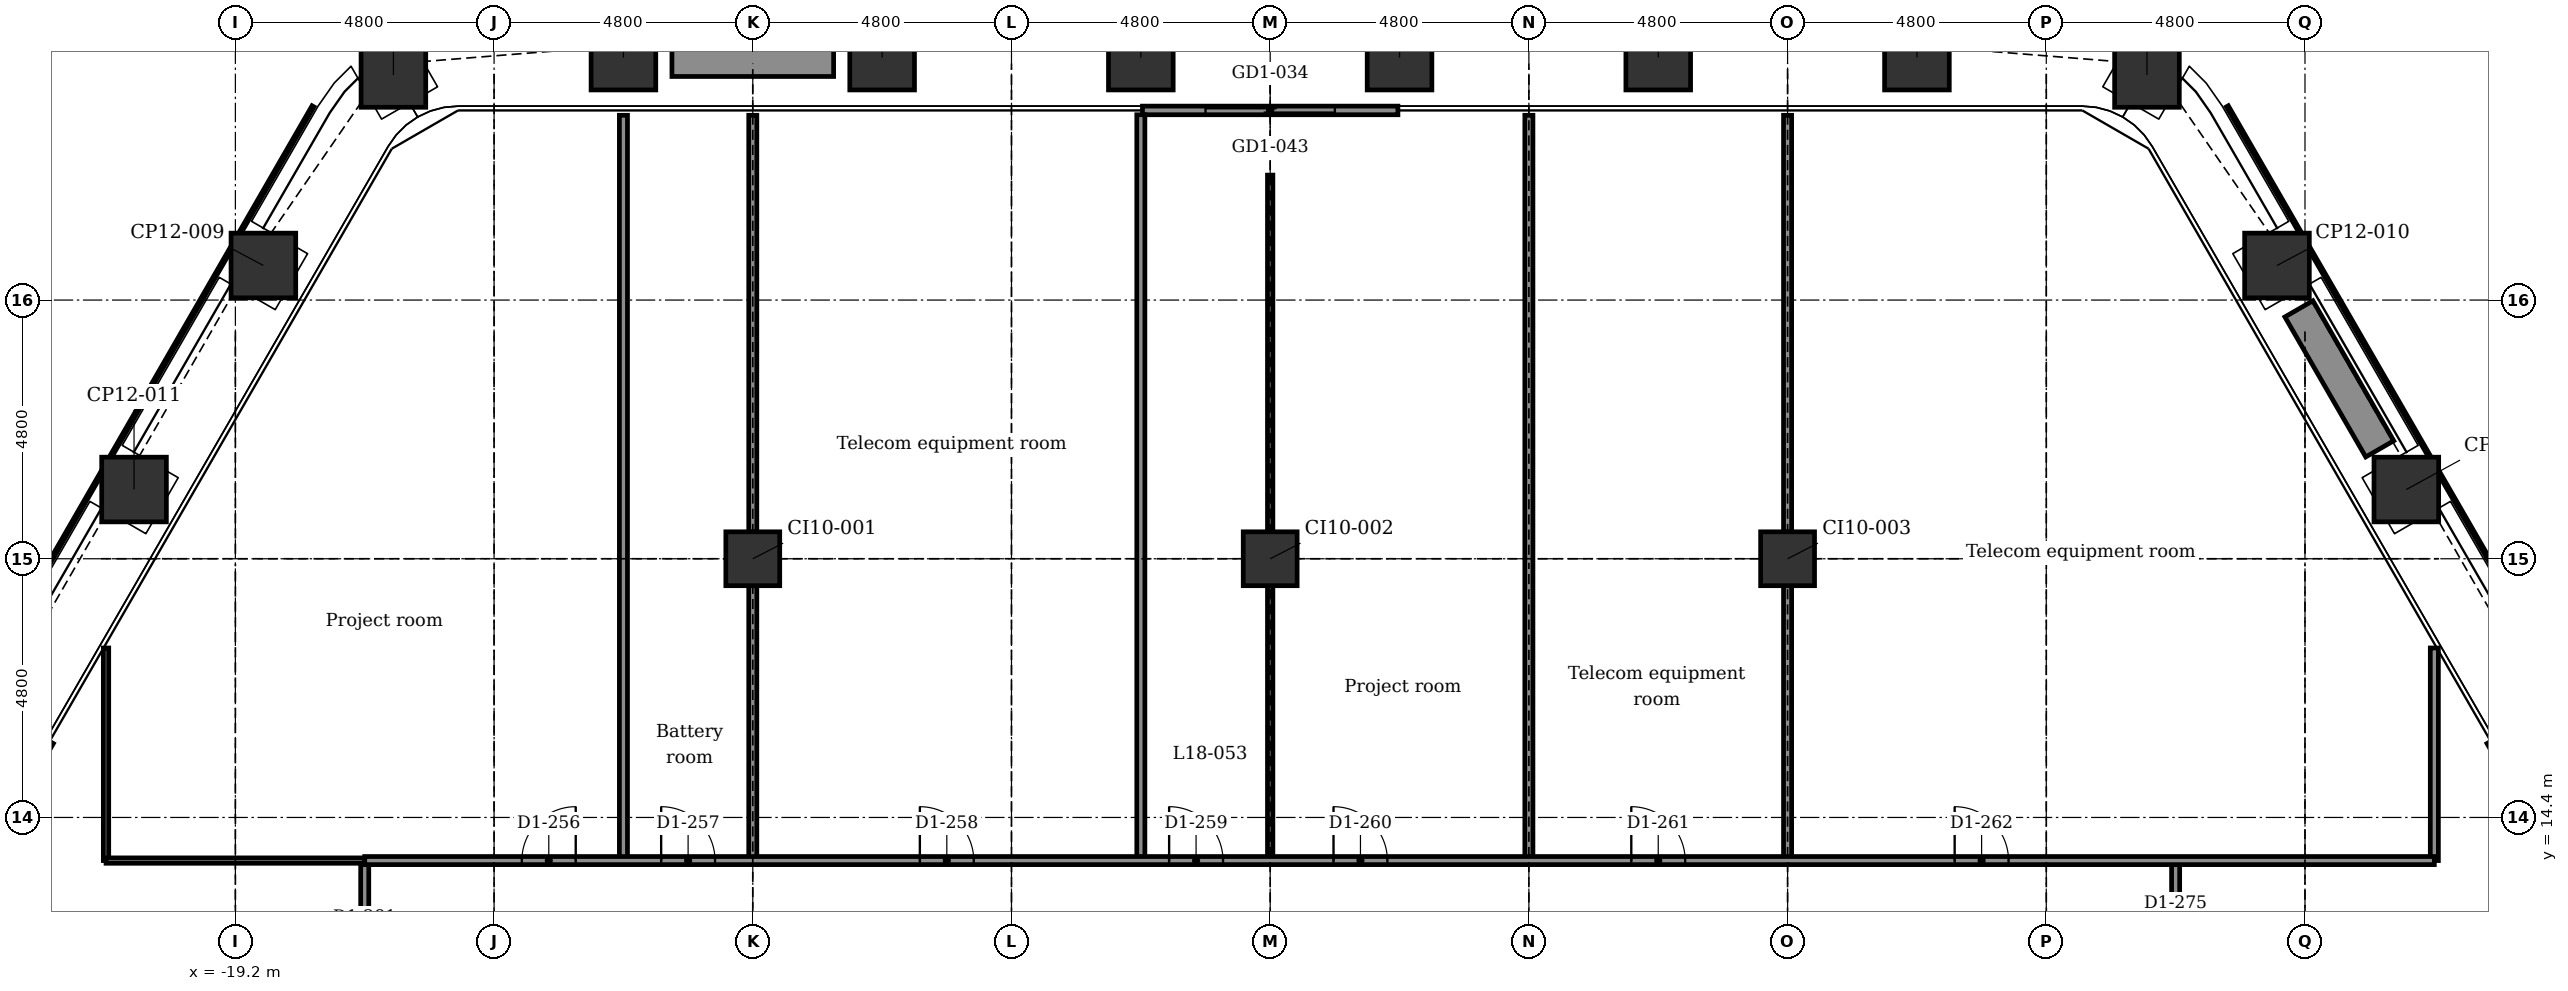
"""IFC4 building model, lengths in metres.
Left out: names, types, materials, properties, quantities, classifications, styles, units other than length and angle.
Written with IfcOpenShell. Run it as: python <this file> out.ifc"""

import sys

from ifc_helpers import new_model, si_unit, direction, frame, frame_2d, origin, origin_2d, place, context, subcontext, project, spatial, rectangle, extrude, element, fill, save


model = new_model("IFC4")
c1 = context("Model", 3, precision=1e-05, world=origin(), true_north=direction((0.0, 1.0)))
c2 = subcontext(c1, "Body", "Model", "MODEL_VIEW")
j1 = project(units=[si_unit("LENGTHUNIT", "METRE"), si_unit("PLANEANGLEUNIT", "RADIAN")], contexts=[c1])
p1 = place(None, origin())
s1 = spatial("IfcSite", under=j1, at=p1, CompositionType="ELEMENT")
p2 = place(p1, origin())
s2 = spatial("IfcBuilding", under=s1, at=p2, CompositionType="ELEMENT")
p3 = place(p2, frame((0.0, 0.0, 95.9)))
s3 = spatial("IfcBuildingStorey", under=s2, at=p3, CompositionType="ELEMENT", Elevation=95.9)
for number, where, z_axis, x_axis in (
    (1, (-16.268, 28.177, -0.2), (0.0, 0.0, 1.0), (0.866, 0.5, 0.0)),
    (2, (-12.0, 28.499, -0.2), (0.0, 0.0, 1.0), (1.0, 0.0, 0.0)),
    (3, (-7.2, 28.499, -0.2), (0.0, 0.0, 1.0), (1.0, 0.0, 0.0)),
    (4, (-2.4, 28.499, -0.2), (0.0, 0.0, 1.0), (1.0, 0.0, 0.0)),
    (5, (2.4, 28.499, -0.2), (0.0, 0.0, 1.0), (1.0, 0.0, 0.0)),
    (6, (7.2, 28.499, -0.2), (0.0, 0.0, 1.0), (1.0, 0.0, 0.0)),
    (7, (12.0, 28.499, -0.2), (0.0, 0.0, 1.0), (1.0, 0.0, 0.0)),
    (8, (16.268, 28.177, -0.2), (0.0, 0.0, 1.0), (0.5, 0.866, 0.0)),
    (9, (18.68, 24.642, -0.2), (0.0, 0.0, 1.0), (0.866, 0.5, 0.0)),
    (10, (21.08, 20.485, -0.2), (0.0, 0.0, 1.0), (0.866, 0.5, 0.0)),
    (11, (-21.08, 20.485, -0.2), (0.0, 0.0, 1.0), (0.5, 0.866, 0.0)),
    (12, (-18.68, 24.642, -0.2), (0.0, 0.0, 1.0), (0.5, 0.866, 0.0)),
):
    element("IfcColumn", number, at=place(p3, frame(where, z_axis=z_axis, x_axis=x_axis)), inside=s3, PredefinedType="COLUMN", context=c2, shape_type="SweptSolid", body=[
        extrude(rectangle(XDim=1.2, YDim=1.2, at=origin_2d()), origin(), (0.0, 0.0, 1.0), 4.5),
    ])
for number, where, z_axis, x_axis in (
    (13, (-9.6, 19.2, -0.2), (0.0, 0.0, 1.0), (1.0, 0.0, 0.0)),
    (14, (0.0, 19.2, -0.2), (0.0, 0.0, 1.0), (1.0, 0.0, 0.0)),
    (15, (9.6, 19.2, -0.2), (0.0, 0.0, 1.0), (1.0, 0.0, 0.0)),
):
    element("IfcColumn", number, at=place(p3, frame(where, z_axis=z_axis, x_axis=x_axis)), inside=s3, PredefinedType="COLUMN", context=c2, shape_type="SweptSolid", body=[
        extrude(rectangle(XDim=1.0, YDim=1.0, at=origin_2d()), origin(), (0.0, 0.0, 1.0), 4.5),
    ])
p4 = place(p3, frame((-2.37, 27.519, 0.0), z_axis=(0.0, 0.0, 1.0), x_axis=(1.0, 0.0, 0.0)))
e16 = element("IfcWall", 16, at=p4, inside=s3, PredefinedType="PARTITIONING", context=c2, shape_type="SweptSolid", body=[
    extrude(rectangle(XDim=4.74, YDim=0.16, at=frame_2d((2.37, 0.0))), origin(), (0.0, 0.0, 1.0), 4.3),
])
p5 = place(p4, frame((1.17, 0.0, 0.0)))
e17 = element("IfcOpeningElement", 17, at=p5, cuts=e16, PredefinedType="OPENING", context=c2, shape_type="SweptSolid", body=[
    extrude(rectangle(XDim=2.4, YDim=2.4, at=frame_2d((1.2, 1.2))), frame((0.0, 0.09, 0.0), z_axis=(0.0, -1.0, 0.0), x_axis=(1.0, 0.0, 0.0)), (0.0, 0.0, 1.0), 0.18),
])
p6 = place(p3, frame((22.647, 15.812, 0.0), z_axis=(0.0, 0.0, 1.0), x_axis=(0.499978080042, -0.866038058908, 0.0)))
e18 = element("IfcWall", 18, at=p6, inside=s3, PredefinedType="PARTITIONING", context=c2, shape_type="SweptSolid", body=[
    extrude(rectangle(XDim=4.74, YDim=0.16, at=frame_2d((2.37, 0.0))), origin(), (0.0, 0.0, 1.0), 4.3),
])
p7 = place(p6, frame((1.17, 0.0, 0.0)))
e19 = element("IfcOpeningElement", 19, at=p7, cuts=e18, PredefinedType="OPENING", context=c2, shape_type="SweptSolid", body=[
    extrude(rectangle(XDim=2.4, YDim=2.4, at=frame_2d((1.2, 1.2))), frame((0.0, 0.09, 0.0), z_axis=(0.0, -1.0, 0.0), x_axis=(1.0, 0.0, 0.0)), (0.0, 0.0, 1.0), 0.18),
])
p8 = place(p3, frame((-25.017, 11.707, 0.0), z_axis=(0.0, 0.0, 1.0), x_axis=(0.499978080042, 0.866038058908, 0.0)))
e20 = element("IfcWall", 20, at=p8, inside=s3, PredefinedType="PARTITIONING", context=c2, shape_type="SweptSolid", body=[
    extrude(rectangle(XDim=4.74, YDim=0.16, at=frame_2d((2.37, 0.0))), origin(), (0.0, 0.0, 1.0), 4.3),
])
p9 = place(p8, frame((1.17, 0.0, 0.0)))
e21 = element("IfcOpeningElement", 21, at=p9, cuts=e20, PredefinedType="OPENING", context=c2, shape_type="SweptSolid", body=[
    extrude(rectangle(XDim=2.4, YDim=2.4, at=frame_2d((1.2, 1.2))), frame((0.0, 0.09, 0.0), z_axis=(0.0, -1.0, 0.0), x_axis=(1.0, 0.0, 0.0)), (0.0, 0.0, 1.0), 0.18),
])
for number, where, z_axis, x_axis in (
    (22, (-11.1, 28.448, 0.0), (0.0, 0.0, 1.0), (1.0, 0.0, 0.0)),
    (23, (19.087, 23.837, 0.0), (0.0, 0.0, 1.0), (0.5, -0.866, 0.0)),
):
    element("IfcWall", number, at=place(p3, frame(where, z_axis=z_axis, x_axis=x_axis)), inside=s3, PredefinedType="USERDEFINED", context=c2, shape_type="SweptSolid", body=[
        extrude(rectangle(XDim=3.0, YDim=0.6, at=frame_2d((1.5, 0.0))), origin(), (0.0, 0.0, 1.0), 0.7),
    ])
p10 = place(p3, frame((21.6, 13.6, 0.0), z_axis=(0.0, 0.0, 1.0), x_axis=(0.0, 1.0, 0.0)))
e24 = element("IfcWall", 24, at=p10, inside=s3, PredefinedType="PARTITIONING", context=c2, shape_type="SweptSolid", body=[
    extrude(rectangle(XDim=3.945, YDim=0.15, at=frame_2d((1.972, 0.0))), origin(), (0.0, 0.0, 1.0), 4.3),
])
p11 = place(p3, frame((16.8, 3.95, 0.0), z_axis=(0.0, 0.0, 1.0), x_axis=(0.0, 1.0, 0.0)))
e25 = element("IfcWall", 25, at=p11, inside=s3, PredefinedType="PARTITIONING", context=c2, shape_type="SweptSolid", body=[
    extrude(rectangle(XDim=9.65, YDim=0.15, at=frame_2d((4.825, 0.0))), origin(), (0.0, 0.0, 1.0), 4.3),
])
p12 = place(p11, frame((0.95, 0.0, 0.0)))
e26 = element("IfcOpeningElement", 26, at=p12, cuts=e25, PredefinedType="OPENING", context=c2, shape_type="SweptSolid", body=[
    extrude(rectangle(XDim=1.0, YDim=2.1, at=frame_2d((0.5, 1.05))), frame((0.0, 0.085, 0.0), z_axis=(0.0, -1.0, 0.0), x_axis=(1.0, 0.0, 0.0)), (0.0, 0.0, 1.0), 0.17),
])
p13 = place(p11, frame((4.095, 0.0, 0.0)))
e27 = element("IfcOpeningElement", 27, at=p13, cuts=e25, PredefinedType="OPENING", context=c2, shape_type="SweptSolid", body=[
    extrude(rectangle(XDim=1.0, YDim=2.1, at=frame_2d((0.5, 1.05))), frame((0.0, 0.085, 0.0), z_axis=(0.0, -1.0, 0.0), x_axis=(1.0, 0.0, 0.0)), (0.0, 0.0, 1.0), 0.17),
])
p14 = place(p11, frame((7.35, 0.0, 0.0)))
e28 = element("IfcOpeningElement", 28, at=p14, cuts=e25, PredefinedType="OPENING", context=c2, shape_type="SweptSolid", body=[
    extrude(rectangle(XDim=1.0, YDim=2.1, at=frame_2d((0.5, 1.05))), frame((0.0, 0.085, 0.0), z_axis=(0.0, -1.0, 0.0), x_axis=(1.0, 0.0, 0.0)), (0.0, 0.0, 1.0), 0.17),
])
p15 = place(p3, frame((9.6, 13.6, 0.0), z_axis=(0.0, 0.0, 1.0), x_axis=(0.0, 1.0, 0.0)))
e29 = element("IfcWall", 29, at=p15, inside=s3, PredefinedType="PARTITIONING", context=c2, shape_type="SweptSolid", body=[
    extrude(rectangle(XDim=5.1, YDim=0.15, at=frame_2d((2.55, 0.0))), origin(), (0.0, 0.0, 1.0), 3.843),
])
p16 = place(p3, frame((9.6, 19.7, 0.0), z_axis=(0.0, 0.0, 1.0), x_axis=(0.0, 1.0, 0.0)))
e30 = element("IfcWall", 30, at=p16, inside=s3, PredefinedType="PARTITIONING", context=c2, shape_type="SweptSolid", body=[
    extrude(rectangle(XDim=7.729, YDim=0.15, at=frame_2d((3.864, 0.0))), origin(), (0.0, 0.0, 1.0), 3.843),
])
p17 = place(p3, frame((4.8, 13.6, 0.0), z_axis=(0.0, 0.0, 1.0), x_axis=(0.0, 1.0, 0.0)))
e31 = element("IfcWall", 31, at=p17, inside=s3, PredefinedType="PARTITIONING", context=c2, shape_type="SweptSolid", body=[
    extrude(rectangle(XDim=13.828, YDim=0.15, at=frame_2d((6.914, 0.0))), origin(), (0.0, 0.0, 1.0), 3.843),
])
p18 = place(p3, frame((0.0, 13.6, 0.0), z_axis=(0.0, 0.0, 1.0), x_axis=(0.0, 1.0, 0.0)))
e32 = element("IfcWall", 32, at=p18, inside=s3, PredefinedType="PARTITIONING", context=c2, shape_type="SweptSolid", body=[
    extrude(rectangle(XDim=5.1, YDim=0.1, at=frame_2d((2.55, 0.0))), origin(), (0.0, 0.0, 1.0), 3.843),
])
p19 = place(p3, frame((0.0, 19.7, 0.0), z_axis=(0.0, 0.0, 1.0), x_axis=(0.0, 1.0, 0.0)))
e33 = element("IfcWall", 33, at=p19, inside=s3, PredefinedType="PARTITIONING", context=c2, shape_type="SweptSolid", body=[
    extrude(rectangle(XDim=6.619, YDim=0.1, at=frame_2d((3.309, 0.0))), origin(), (0.0, 0.0, 1.0), 3.843),
])
p20 = place(p3, frame((-2.4, 13.6, 0.0), z_axis=(0.0, 0.0, 1.0), x_axis=(0.0, 1.0, 0.0)))
e34 = element("IfcWall", 34, at=p20, inside=s3, PredefinedType="PARTITIONING", context=c2, shape_type="SweptSolid", body=[
    extrude(rectangle(XDim=13.838, YDim=0.15, at=frame_2d((6.919, 0.0))), origin(), (0.0, 0.0, 1.0), 4.3),
])
p21 = place(p3, frame((-9.6, 13.6, 0.0), z_axis=(0.0, 0.0, 1.0), x_axis=(0.0, 1.0, 0.0)))
e35 = element("IfcWall", 35, at=p21, inside=s3, PredefinedType="PARTITIONING", context=c2, shape_type="SweptSolid", body=[
    extrude(rectangle(XDim=5.1, YDim=0.15, at=frame_2d((2.55, 0.0))), origin(), (0.0, 0.0, 1.0), 3.843),
])
p22 = place(p3, frame((-9.6, 19.7, 0.0), z_axis=(0.0, 0.0, 1.0), x_axis=(0.0, 1.0, 0.0)))
e36 = element("IfcWall", 36, at=p22, inside=s3, PredefinedType="PARTITIONING", context=c2, shape_type="SweptSolid", body=[
    extrude(rectangle(XDim=7.729, YDim=0.15, at=frame_2d((3.864, 0.0))), origin(), (0.0, 0.0, 1.0), 3.843),
])
p23 = place(p3, frame((-12.0, 13.6, 0.0), z_axis=(0.0, 0.0, 1.0), x_axis=(0.0, 1.0, 0.0)))
e37 = element("IfcWall", 37, at=p23, inside=s3, PredefinedType="PARTITIONING", context=c2, shape_type="SweptSolid", body=[
    extrude(rectangle(XDim=13.828, YDim=0.15, at=frame_2d((6.914, 0.0))), origin(), (0.0, 0.0, 1.0), 4.3),
])
p24 = place(p3, frame((-16.8, 3.95, 0.0), z_axis=(0.0, 0.0, 1.0), x_axis=(0.0, 1.0, 0.0)))
e38 = element("IfcWall", 38, at=p24, inside=s3, PredefinedType="PARTITIONING", context=c2, shape_type="SweptSolid", body=[
    extrude(rectangle(XDim=9.65, YDim=0.15, at=frame_2d((4.825, 0.0))), origin(), (0.0, 0.0, 1.0), 4.3),
])
p25 = place(p24, frame((0.95, 0.0, 0.0)))
e39 = element("IfcOpeningElement", 39, at=p25, cuts=e38, PredefinedType="OPENING", context=c2, shape_type="SweptSolid", body=[
    extrude(rectangle(XDim=1.0, YDim=2.1, at=frame_2d((0.5, 1.05))), frame((0.0, 0.085, 0.0), z_axis=(0.0, -1.0, 0.0), x_axis=(1.0, 0.0, 0.0)), (0.0, 0.0, 1.0), 0.17),
])
p26 = place(p24, frame((4.095, 0.0, 0.0)))
e40 = element("IfcOpeningElement", 40, at=p26, cuts=e38, PredefinedType="OPENING", context=c2, shape_type="SweptSolid", body=[
    extrude(rectangle(XDim=1.0, YDim=2.1, at=frame_2d((0.5, 1.05))), frame((0.0, 0.085, 0.0), z_axis=(0.0, -1.0, 0.0), x_axis=(1.0, 0.0, 0.0)), (0.0, 0.0, 1.0), 0.17),
])
p27 = place(p24, frame((7.095, 0.0, 0.0)))
e41 = element("IfcOpeningElement", 41, at=p27, cuts=e38, PredefinedType="OPENING", context=c2, shape_type="SweptSolid", body=[
    extrude(rectangle(XDim=1.0, YDim=2.1, at=frame_2d((0.5, 1.05))), frame((0.0, 0.085, 0.0), z_axis=(0.0, -1.0, 0.0), x_axis=(1.0, 0.0, 0.0)), (0.0, 0.0, 1.0), 0.17),
])
p28 = place(p3, frame((-21.6, 13.6, 0.0), z_axis=(0.0, 0.0, 1.0), x_axis=(0.0, 1.0, 0.0)))
e42 = element("IfcWall", 42, at=p28, inside=s3, PredefinedType="PARTITIONING", context=c2, shape_type="SweptSolid", body=[
    extrude(rectangle(XDim=3.945, YDim=0.1, at=frame_2d((1.972, 0.0))), origin(), (0.0, 0.0, 1.0), 4.3),
])
p29 = place(p3, frame((-21.6, 13.6, 0.0), z_axis=(0.0, 0.0, 1.0), x_axis=(1.0, 0.0, 0.0)))
e43 = element("IfcWall", 43, at=p29, inside=s3, PredefinedType="PARTITIONING", context=c2, shape_type="SweptSolid", body=[
    extrude(rectangle(XDim=4.8, YDim=0.1, at=frame_2d((2.4, 0.0))), origin(), (0.0, 0.0, 1.0), 4.3),
])
p30 = place(p3, frame((-16.8, 13.6, 0.0), z_axis=(0.0, 0.0, 1.0), x_axis=(1.0, 0.0, 0.0)))
e44 = element("IfcWall", 44, at=p30, inside=s3, PredefinedType="PARTITIONING", context=c2, shape_type="SweptSolid", body=[
    extrude(rectangle(XDim=38.4, YDim=0.15, at=frame_2d((19.2, 0.0))), origin(), (0.0, 0.0, 1.0), 4.3),
])
p31 = place(p30, frame((2.915, 0.0, 0.0)))
e45 = element("IfcOpeningElement", 45, at=p31, cuts=e44, PredefinedType="OPENING", context=c2, shape_type="SweptSolid", body=[
    extrude(rectangle(XDim=1.0, YDim=2.1, at=frame_2d((0.5, 1.05))), frame((0.0, 0.085, 0.0), z_axis=(0.0, -1.0, 0.0), x_axis=(1.0, 0.0, 0.0)), (0.0, 0.0, 1.0), 0.17),
])
p32 = place(p30, frame((5.5, 0.0, 0.0)))
e46 = element("IfcOpeningElement", 46, at=p32, cuts=e44, PredefinedType="OPENING", context=c2, shape_type="SweptSolid", body=[
    extrude(rectangle(XDim=1.0, YDim=2.1, at=frame_2d((0.5, 1.05))), frame((0.0, 0.085, 0.0), z_axis=(0.0, -1.0, 0.0), x_axis=(1.0, 0.0, 0.0)), (0.0, 0.0, 1.0), 0.17),
])
p33 = place(p30, frame((10.3, 0.0, 0.0)))
e47 = element("IfcOpeningElement", 47, at=p33, cuts=e44, PredefinedType="OPENING", context=c2, shape_type="SweptSolid", body=[
    extrude(rectangle(XDim=1.0, YDim=2.1, at=frame_2d((0.5, 1.05))), frame((0.0, 0.085, 0.0), z_axis=(0.0, -1.0, 0.0), x_axis=(1.0, 0.0, 0.0)), (0.0, 0.0, 1.0), 0.17),
])
p34 = place(p30, frame((14.925, 0.0, 0.0)))
e48 = element("IfcOpeningElement", 48, at=p34, cuts=e44, PredefinedType="OPENING", context=c2, shape_type="SweptSolid", body=[
    extrude(rectangle(XDim=1.0, YDim=2.1, at=frame_2d((0.5, 1.05))), frame((0.0, 0.085, 0.0), z_axis=(0.0, -1.0, 0.0), x_axis=(1.0, 0.0, 0.0)), (0.0, 0.0, 1.0), 0.17),
])
p35 = place(p30, frame((17.975, 0.0, 0.0)))
e49 = element("IfcOpeningElement", 49, at=p35, cuts=e44, PredefinedType="OPENING", context=c2, shape_type="SweptSolid", body=[
    extrude(rectangle(XDim=1.0, YDim=2.1, at=frame_2d((0.5, 1.05))), frame((0.0, 0.085, 0.0), z_axis=(0.0, -1.0, 0.0), x_axis=(1.0, 0.0, 0.0)), (0.0, 0.0, 1.0), 0.17),
])
p36 = place(p30, frame((23.5, 0.0, 0.0)))
e50 = element("IfcOpeningElement", 50, at=p36, cuts=e44, PredefinedType="OPENING", context=c2, shape_type="SweptSolid", body=[
    extrude(rectangle(XDim=1.0, YDim=2.1, at=frame_2d((0.5, 1.05))), frame((0.0, 0.085, 0.0), z_axis=(0.0, -1.0, 0.0), x_axis=(1.0, 0.0, 0.0)), (0.0, 0.0, 1.0), 0.17),
])
p37 = place(p30, frame((29.5, 0.0, 0.0)))
e51 = element("IfcOpeningElement", 51, at=p37, cuts=e44, PredefinedType="OPENING", context=c2, shape_type="SweptSolid", body=[
    extrude(rectangle(XDim=1.0, YDim=2.1, at=frame_2d((0.5, 1.05))), frame((0.0, 0.085, 0.0), z_axis=(0.0, -1.0, 0.0), x_axis=(1.0, 0.0, 0.0)), (0.0, 0.0, 1.0), 0.17),
])
p38 = place(p5, origin())
e52 = element("IfcDoor", 52, at=p38, inside=s3, OperationType="DOUBLE_DOOR_SLIDING", PredefinedType="DOOR", context=c2, shape_type="SweptSolid", body=[
    extrude(rectangle(XDim=2.4, YDim=2.4, at=frame_2d((1.2, 1.2))), frame((0.0, 0.025, 0.0), z_axis=(0.0, -1.0, 0.0), x_axis=(1.0, 0.0, 0.0)), (0.0, 0.0, 1.0), 0.05),
])
fill(e17, e52)
p39 = place(p31, origin())
e53 = element("IfcDoor", 53, at=p39, inside=s3, OperationType="SINGLE_SWING_RIGHT", PredefinedType="DOOR", context=c2, shape_type="SweptSolid", body=[
    extrude(rectangle(XDim=1.0, YDim=2.1, at=frame_2d((0.5, 1.05))), frame((0.0, 0.025, 0.0), z_axis=(0.0, -1.0, 0.0), x_axis=(1.0, 0.0, 0.0)), (0.0, 0.0, 1.0), 0.05),
])
fill(e45, e53)
p40 = place(p32, origin())
e54 = element("IfcDoor", 54, at=p40, inside=s3, OperationType="SINGLE_SWING_LEFT", PredefinedType="DOOR", context=c2, shape_type="SweptSolid", body=[
    extrude(rectangle(XDim=1.0, YDim=2.1, at=frame_2d((0.5, 1.05))), frame((0.0, 0.025, 0.0), z_axis=(0.0, -1.0, 0.0), x_axis=(1.0, 0.0, 0.0)), (0.0, 0.0, 1.0), 0.05),
])
fill(e46, e54)
p41 = place(p33, origin())
e55 = element("IfcDoor", 55, at=p41, inside=s3, OperationType="SINGLE_SWING_LEFT", PredefinedType="DOOR", context=c2, shape_type="SweptSolid", body=[
    extrude(rectangle(XDim=1.0, YDim=2.1, at=frame_2d((0.5, 1.05))), frame((0.0, 0.025, 0.0), z_axis=(0.0, -1.0, 0.0), x_axis=(1.0, 0.0, 0.0)), (0.0, 0.0, 1.0), 0.05),
])
fill(e47, e55)
p42 = place(p34, origin())
e56 = element("IfcDoor", 56, at=p42, inside=s3, OperationType="SINGLE_SWING_LEFT", PredefinedType="DOOR", context=c2, shape_type="SweptSolid", body=[
    extrude(rectangle(XDim=1.0, YDim=2.1, at=frame_2d((0.5, 1.05))), frame((0.0, 0.025, 0.0), z_axis=(0.0, -1.0, 0.0), x_axis=(1.0, 0.0, 0.0)), (0.0, 0.0, 1.0), 0.05),
])
fill(e48, e56)
p43 = place(p35, origin())
e57 = element("IfcDoor", 57, at=p43, inside=s3, OperationType="SINGLE_SWING_LEFT", PredefinedType="DOOR", context=c2, shape_type="SweptSolid", body=[
    extrude(rectangle(XDim=1.0, YDim=2.1, at=frame_2d((0.5, 1.05))), frame((0.0, 0.025, 0.0), z_axis=(0.0, -1.0, 0.0), x_axis=(1.0, 0.0, 0.0)), (0.0, 0.0, 1.0), 0.05),
])
fill(e49, e57)
p44 = place(p36, origin())
e58 = element("IfcDoor", 58, at=p44, inside=s3, OperationType="SINGLE_SWING_LEFT", PredefinedType="DOOR", context=c2, shape_type="SweptSolid", body=[
    extrude(rectangle(XDim=1.0, YDim=2.1, at=frame_2d((0.5, 1.05))), frame((0.0, 0.025, 0.0), z_axis=(0.0, -1.0, 0.0), x_axis=(1.0, 0.0, 0.0)), (0.0, 0.0, 1.0), 0.05),
])
fill(e50, e58)
p45 = place(p37, origin())
e59 = element("IfcDoor", 59, at=p45, inside=s3, OperationType="SINGLE_SWING_LEFT", PredefinedType="DOOR", context=c2, shape_type="SweptSolid", body=[
    extrude(rectangle(XDim=1.0, YDim=2.1, at=frame_2d((0.5, 1.05))), frame((0.0, 0.025, 0.0), z_axis=(0.0, -1.0, 0.0), x_axis=(1.0, 0.0, 0.0)), (0.0, 0.0, 1.0), 0.05),
])
fill(e51, e59)
save(model, sys.argv[1])
